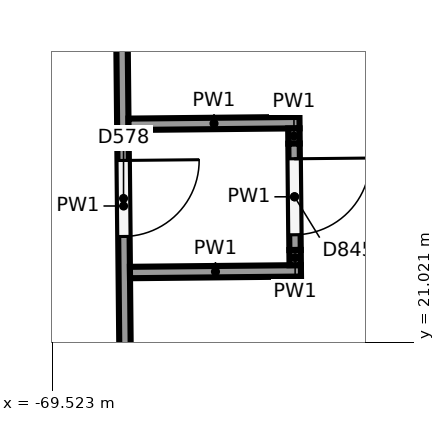
"""IFC4 building model, lengths in metres.
Left out: names, types, materials, properties, quantities, classifications, styles, units other than length and angle.
Written with IfcOpenShell. Run it as: python <this file> out.ifc"""

import sys

from ifc_helpers import new_model, si_unit, direction, frame, frame_2d, origin, place, context, subcontext, project, spatial, rectangle, extrude, element, fill, save


model = new_model("IFC4")
c1 = context("Model", 3, precision=1e-05, world=origin(), true_north=direction((0.0, 1.0)))
c2 = subcontext(c1, "Body", "Model", "MODEL_VIEW")
j1 = project(units=[si_unit("LENGTHUNIT", "METRE"), si_unit("PLANEANGLEUNIT", "RADIAN")], contexts=[c1])
p1 = place(None, origin())
s1 = spatial("IfcSite", under=j1, at=p1, CompositionType="ELEMENT")
p2 = place(p1, origin())
s2 = spatial("IfcBuilding", under=s1, at=p2, CompositionType="ELEMENT")
p3 = place(p2, origin())
s3 = spatial("IfcBuildingStorey", under=s2, at=p3, CompositionType="ELEMENT", Elevation=0.0)
p4 = place(p3, frame((-68.628, 27.361, 0.0), z_axis=(0.0, 0.0, 1.0), x_axis=(0.009740581754, -0.999952559408, 0.0)))
e1 = element("IfcWall", 1, at=p4, inside=s3, PredefinedType="PARTITIONING", context=c2, shape_type="SweptSolid", body=[
    extrude(rectangle(XDim=9.098, YDim=0.15, at=frame_2d((4.549, 0.0))), origin(), (0.0, 0.0, 1.0), 6.15),
])
p5 = place(p4, frame((3.95, 0.0, 0.0)))
e2 = element("IfcOpeningElement", 2, at=p5, cuts=e1, PredefinedType="OPENING", context=c2, shape_type="SweptSolid", body=[
    extrude(rectangle(XDim=1.0, YDim=2.1, at=frame_2d((0.5, 1.05))), frame((0.0, 0.085, 0.0), z_axis=(0.0, -1.0, 0.0), x_axis=(1.0, 0.0, 0.0)), (0.0, 0.0, 1.0), 0.17),
])
for number, where, z_axis, x_axis in (
    (3, (-68.52, 23.887, 0.0), (0.0, 0.0, 1.0), (1.0, 0.01, 0.0)),
    (4, (-68.5, 21.937, 0.0), (0.0, 0.0, 1.0), (1.0, 0.01, 0.0)),
):
    element("IfcWall", number, at=place(p3, frame(where, z_axis=z_axis, x_axis=x_axis)), inside=s3, PredefinedType="PARTITIONING", context=c2, shape_type="SweptSolid", body=[
        extrude(rectangle(XDim=2.25, YDim=0.15, at=frame_2d((1.125, 0.0))), origin(), (0.0, 0.0, 1.0), 6.15),
    ])
p6 = place(p3, frame((-66.344, 23.833, 0.0), z_axis=(0.0, 0.0, 1.0), x_axis=(0.009755633294, -0.999952412677, 0.0)))
e5 = element("IfcWall", 5, at=p6, inside=s3, PredefinedType="PARTITIONING", context=c2, shape_type="SweptSolid", body=[
    extrude(rectangle(XDim=0.2, YDim=0.15, at=frame_2d((0.1, 0.0))), origin(), (0.0, 0.0, 1.0), 6.15),
])
p7 = place(p3, frame((-66.342, 23.633, 0.0), z_axis=(0.0, 0.0, 1.0), x_axis=(0.009765840518, -0.999952313042, 0.0)))
e6 = element("IfcWall", 6, at=p7, inside=s3, PredefinedType="PARTITIONING", context=c2, shape_type="SweptSolid", body=[
    extrude(rectangle(XDim=1.4, YDim=0.15, at=frame_2d((0.7, 0.0))), origin(), (0.0, 0.0, 1.0), 6.15),
])
p8 = place(p7, frame((0.2, 0.0, 0.0)))
e7 = element("IfcOpeningElement", 7, at=p8, cuts=e6, PredefinedType="OPENING", context=c2, shape_type="SweptSolid", body=[
    extrude(rectangle(XDim=1.0, YDim=2.1, at=frame_2d((0.5, 1.05))), frame((0.0, 0.085, 0.0), z_axis=(0.0, -1.0, 0.0), x_axis=(1.0, 0.0, 0.0)), (0.0, 0.0, 1.0), 0.17),
])
p9 = place(p3, frame((-66.328, 22.233, 0.0), z_axis=(0.0, 0.0, 1.0), x_axis=(0.009767543799, -0.999952296406, 0.0)))
e8 = element("IfcWall", 8, at=p9, inside=s3, PredefinedType="PARTITIONING", context=c2, shape_type="SweptSolid", body=[
    extrude(rectangle(XDim=0.2, YDim=0.15, at=frame_2d((0.1, 0.0))), origin(), (0.0, 0.0, 1.0), 6.15),
])
p10 = place(p5, origin())
e9 = element("IfcDoor", 9, at=p10, inside=s3, OperationType="SINGLE_SWING_LEFT", PredefinedType="DOOR", context=c2, shape_type="SweptSolid", body=[
    extrude(rectangle(XDim=1.0, YDim=2.1, at=frame_2d((0.5, 1.05))), frame((0.0, 0.025, 0.0), z_axis=(0.0, -1.0, 0.0), x_axis=(1.0, 0.0, 0.0)), (0.0, 0.0, 1.0), 0.05),
])
fill(e2, e9)
p11 = place(p8, origin())
e10 = element("IfcDoor", 10, at=p11, inside=s3, OperationType="SINGLE_SWING_LEFT", PredefinedType="DOOR", context=c2, shape_type="SweptSolid", body=[
    extrude(rectangle(XDim=1.0, YDim=2.1, at=frame_2d((0.5, 1.05))), frame((0.0, 0.025, 0.0), z_axis=(0.0, -1.0, 0.0), x_axis=(1.0, 0.0, 0.0)), (0.0, 0.0, 1.0), 0.05),
])
fill(e7, e10)
save(model, sys.argv[1])
